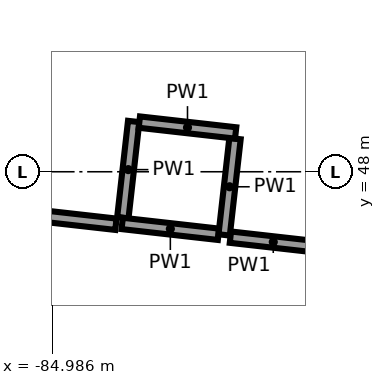
"""IFC4 building model, lengths in metres.
Left out: names, types, materials, properties, quantities, classifications, styles, units other than length and angle.
Written with IfcOpenShell. Run it as: python <this file> out.ifc"""

import sys

from ifc_helpers import new_model, si_unit, direction, frame, frame_2d, origin, place, context, subcontext, project, spatial, rectangle, extrude, element, save


model = new_model("IFC4")
c1 = context("Model", 3, precision=1e-05, world=origin(), true_north=direction((0.0, 1.0)))
c2 = subcontext(c1, "Body", "Model", "MODEL_VIEW")
j1 = project(units=[si_unit("LENGTHUNIT", "METRE"), si_unit("PLANEANGLEUNIT", "RADIAN")], contexts=[c1])
p1 = place(None, origin())
s1 = spatial("IfcSite", under=j1, at=p1, CompositionType="ELEMENT")
p2 = place(p1, origin())
s2 = spatial("IfcBuilding", under=s1, at=p2, CompositionType="ELEMENT")
p3 = place(p2, frame((0.0, 0.0, 12.0)))
s3 = spatial("IfcBuildingStorey", under=s2, at=p3, CompositionType="ELEMENT", Elevation=12.0)
for number, where, z_axis, x_axis in (
    (1, (-83.913, 48.662, 0.0), (0.0, 0.0, 1.0), (-0.112, -0.994, 0.0)),
    (2, (-84.064, 47.32, 0.0), (0.0, 0.0, 1.0), (0.994, -0.112, 0.0)),
):
    element("IfcWall", number, at=place(p3, frame(where, z_axis=z_axis, x_axis=x_axis)), inside=s3, PredefinedType="PARTITIONING", context=c2, shape_type="SweptSolid", body=[
        extrude(rectangle(XDim=1.275, YDim=0.15, at=frame_2d((0.638, 0.0))), origin(), (0.0, 0.0, 1.0), 5.65),
    ])
for number, where, z_axis, x_axis in (
    (3, (-82.723, 47.169, 0.0), (0.0, 0.0, 1.0), (0.112, 0.994, 0.0)),
    (4, (-82.572, 48.51, 0.0), (0.0, 0.0, 1.0), (-0.994, 0.112, 0.0)),
):
    element("IfcWall", number, at=place(p3, frame(where, z_axis=z_axis, x_axis=x_axis)), inside=s3, PredefinedType="PARTITIONING", context=c2, shape_type="SweptSolid", body=[
        extrude(rectangle(XDim=1.275, YDim=0.15, at=frame_2d((0.637, 0.0))), origin(), (0.0, 0.0, 1.0), 5.65),
    ])
p4 = place(p3, frame((-87.827, 47.724, 0.0), z_axis=(0.0, 0.0, 1.0), x_axis=(0.993708869306, -0.11199412066, 0.0)))
e5 = element("IfcWall", 5, at=p4, inside=s3, PredefinedType="PARTITIONING", context=c2, shape_type="SweptSolid", body=[
    extrude(rectangle(XDim=3.704, YDim=0.15, at=frame_2d((1.852, 0.0))), origin(), (0.0, 0.0, 1.0), 4.55),
])
p5 = place(p4, frame((0.65, 0.0, 0.0)))
e6 = element("IfcOpeningElement", 6, at=p5, cuts=e5, PredefinedType="OPENING", context=c2, shape_type="SweptSolid", body=[
    extrude(rectangle(XDim=1.8, YDim=2.1, at=frame_2d((0.9, 1.05))), frame((0.0, 0.085, 0.0), z_axis=(0.0, -1.0, 0.0), x_axis=(1.0, 0.0, 0.0)), (0.0, 0.0, 1.0), 0.17),
])
p6 = place(p3, frame((-82.641, 47.139, 0.0), z_axis=(0.0, 0.0, 1.0), x_axis=(0.993725340882, -0.111847873866, 0.0)))
e7 = element("IfcWall", 7, at=p6, inside=s3, PredefinedType="PARTITIONING", context=c2, shape_type="SweptSolid", body=[
    extrude(rectangle(XDim=1.135, YDim=0.15, at=frame_2d((0.567, 0.0))), origin(), (0.0, 0.0, 1.0), 5.65),
])
save(model, sys.argv[1])
